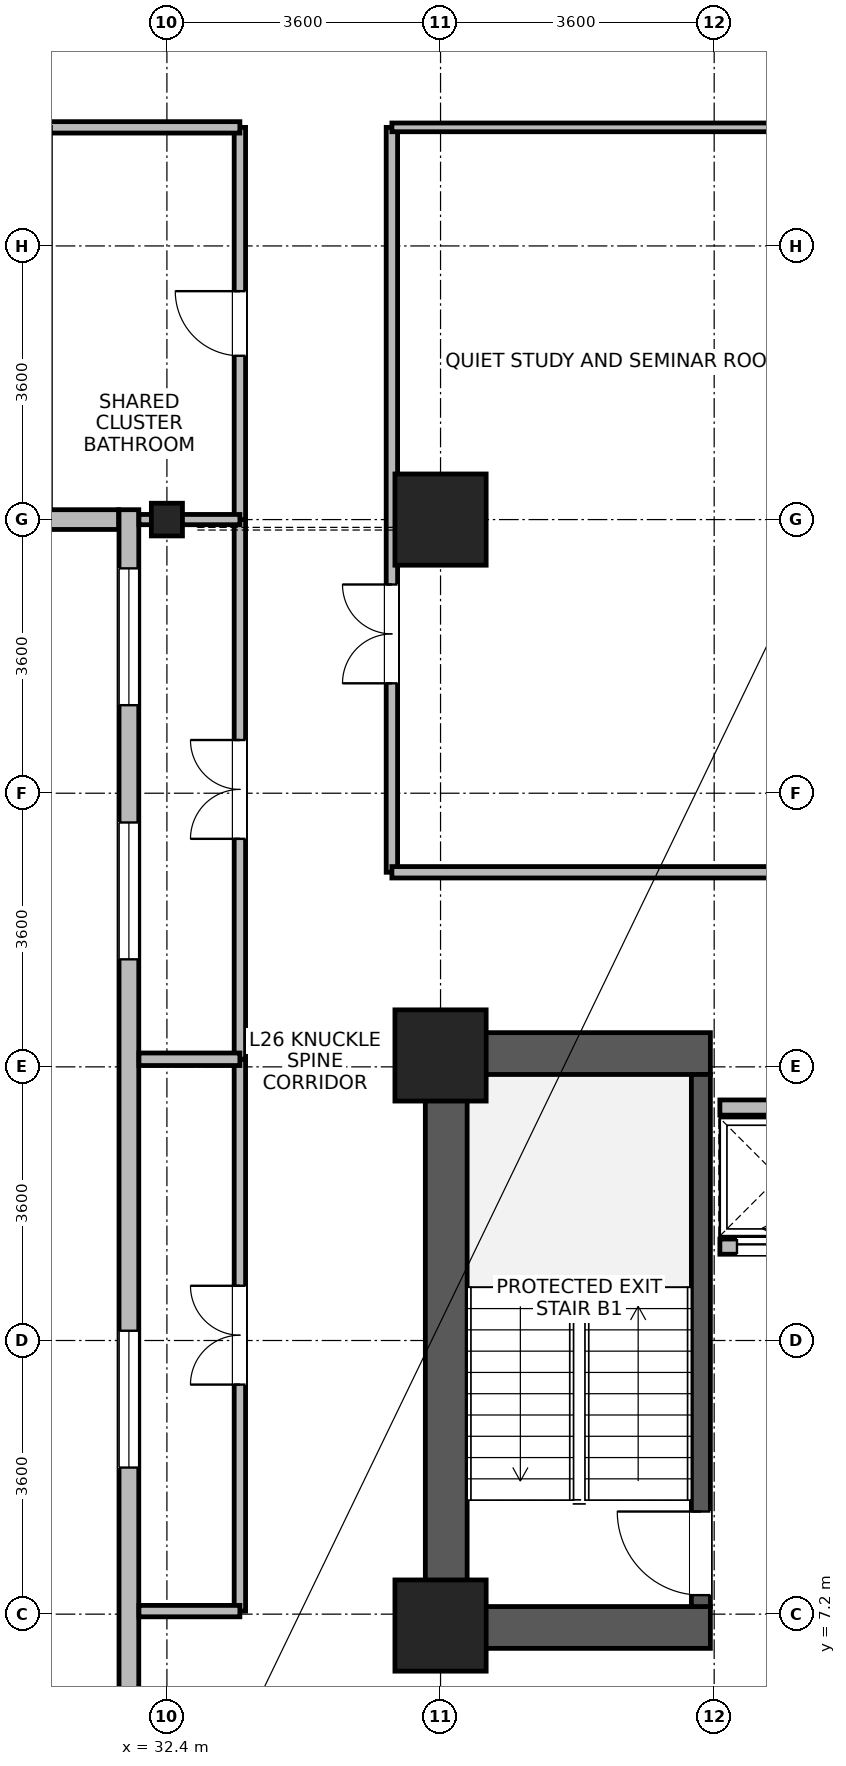
"""IFC4 building model, lengths in metres.
Left out: names, types, materials, properties, quantities, classifications, styles, units other than length and angle.
Written with IfcOpenShell. Run it as: python <this file> out.ifc"""

import sys

from ifc_helpers import new_model, si_unit, direction, frame, frame_2d, origin, origin_2d, place, context, subcontext, project, spatial, rectangle, i_section, extrude, source, transform, mapped, element, fill, save


model = new_model("IFC4")
c1 = context("Model", 3, precision=1e-05, world=origin(), true_north=direction((0.0, 1.0)))
c2 = subcontext(c1, "Body", "Model", "MODEL_VIEW")
j1 = project(units=[si_unit("LENGTHUNIT", "METRE"), si_unit("PLANEANGLEUNIT", "RADIAN")], contexts=[c1])
p1 = place(None, origin())
s1 = spatial("IfcSite", under=j1, at=p1, CompositionType="ELEMENT")
p2 = place(p1, origin())
s2 = spatial("IfcBuilding", under=s1, at=p2, CompositionType="ELEMENT")
p3 = place(p2, frame((0.0, 0.0, 104.5)))
s3 = spatial("IfcBuildingStorey", under=s2, at=p3, CompositionType="ELEMENT", Elevation=104.5)
p4 = place(p3, frame((36.075, 6.75, 0.0), z_axis=(0.0, 0.0, 1.0), x_axis=(0.0, 1.0, 0.0)))
e1 = element("IfcWall", 1, at=p4, inside=s3, PredefinedType="SHEAR", context=c2, shape_type="SweptSolid", body=[
    extrude(rectangle(XDim=8.1, YDim=0.55, at=frame_2d((4.05, 0.0))), origin(), (0.0, 0.0, 1.0), 3.45),
])
for number, where, z_axis, x_axis in (
    (2, (36.35, 7.025, 0.0), (0.0, 0.0, 1.0), (1.0, 0.0, 0.0)),
    (3, (36.35, 14.575, 0.0), (0.0, 0.0, 1.0), (1.0, 0.0, 0.0)),
):
    element("IfcWall", number, at=place(p3, frame(where, z_axis=z_axis, x_axis=x_axis)), inside=s3, PredefinedType="SHEAR", context=c2, shape_type="SweptSolid", body=[
        extrude(rectangle(XDim=3.2, YDim=0.55, at=frame_2d((1.6, 0.0))), origin(), (0.0, 0.0, 1.0), 3.45),
    ])
p5 = place(p3, frame((39.425, 7.3, 0.0), z_axis=(0.0, 0.0, 1.0), x_axis=(0.0, 1.0, 0.0)))
e4 = element("IfcWall", 4, at=p5, inside=s3, PredefinedType="SHEAR", context=c2, shape_type="SweptSolid", body=[
    extrude(rectangle(XDim=7.0, YDim=0.25, at=frame_2d((3.5, 0.0))), origin(), (0.0, 0.0, 1.0), 3.45),
])
p6 = place(p5, frame((0.15, 0.0, 0.0)))
e5 = element("IfcOpeningElement", 5, at=p6, cuts=e4, PredefinedType="OPENING", context=c2, shape_type="SweptSolid", body=[
    extrude(rectangle(XDim=1.1, YDim=2.08, at=frame_2d((0.55, 1.04))), frame((0.0, 0.135, 0.0), z_axis=(0.0, -1.0, 0.0), x_axis=(1.0, 0.0, 0.0)), (0.0, 0.0, 1.0), 0.27),
])
m1 = source(origin(), c2, "Body", "SweptSolid", [
    extrude(rectangle(XDim=1.2, YDim=1.2, at=origin_2d()), origin(), (0.0, 0.0, 1.0), 3.7),
])
for number, where, z_axis, x_axis in (
    (6, (36.0, 21.6, 0.0), (0.0, 0.0, 1.0), (1.0, 0.0, 0.0)),
    (7, (36.0, 7.05, 0.0), (0.0, 0.0, 1.0), (1.0, 0.0, 0.0)),
    (8, (36.0, 14.55, 0.0), (0.0, 0.0, 1.0), (1.0, 0.0, 0.0)),
):
    element("IfcColumn", number, at=place(p3, frame(where, z_axis=z_axis, x_axis=x_axis)), inside=s3, PredefinedType="COLUMN", context=c2, shape_type="MappedRepresentation", body=[
        mapped(m1, transform((0.0, 0.0, 0.0), x_axis=(1.0, 0.0, 0.0), y_axis=(0.0, 1.0, 0.0), z_axis=(0.0, 0.0, 1.0), scale=1.0)),
    ])
m2 = source(origin(), c2, "Body", "SweptSolid", [
    extrude(i_section(OverallWidth=0.409, OverallDepth=0.43, WebThickness=0.024, FlangeThickness=0.033, FilletRadius=0.015, at=origin_2d()), origin(), (0.0, 0.0, 1.0), 3.7),
])
p7 = place(p3, frame((32.4, 21.6, 0.0), z_axis=(0.0, 0.0, 1.0), x_axis=(1.0, 0.0, 0.0)))
e9 = element("IfcColumn", 9, at=p7, inside=s3, PredefinedType="COLUMN", context=c2, shape_type="MappedRepresentation", body=[
    mapped(m2, transform((0.0, 0.0, 0.0), x_axis=(1.0, 0.0, 0.0), y_axis=(0.0, 1.0, 0.0), z_axis=(0.0, 0.0, 1.0), scale=1.0)),
])
p8 = place(p3, frame((31.765, 21.6, 0.0), z_axis=(0.0, 0.0, 1.0), x_axis=(-1.0, 0.0, 0.0)))
e10 = element("IfcWall", 10, at=p8, inside=s3, PredefinedType="STANDARD", context=c2, shape_type="SweptSolid", body=[
    extrude(rectangle(XDim=2.364, YDim=0.26, at=frame_2d((1.182, 0.0))), origin(), (0.0, 0.0, 1.0), 2.98),
])
p9 = place(p3, frame((31.9, 1.67, 0.0), z_axis=(0.0, 0.0, 1.0), x_axis=(0.0, 1.0, 0.0)))
e11 = element("IfcWall", 11, at=p9, inside=s3, PredefinedType="STANDARD", context=c2, shape_type="SweptSolid", body=[
    extrude(rectangle(XDim=20.06, YDim=0.26, at=frame_2d((10.03, 0.0))), origin(), (0.0, 0.0, 1.0), 3.43),
])
p10 = place(p9, frame((0.772, 0.0, 0.85)))
e12 = element("IfcOpeningElement", 12, at=p10, cuts=e11, PredefinedType="OPENING", context=c2, shape_type="SweptSolid", body=[
    extrude(rectangle(XDim=1.8, YDim=1.85, at=frame_2d((0.9, 0.925))), frame((0.0, 0.14, 0.0), z_axis=(0.0, -1.0, 0.0), x_axis=(1.0, 0.0, 0.0)), (0.0, 0.0, 1.0), 0.28),
])
p11 = place(p9, frame((7.458, 0.0, 0.85)))
e13 = element("IfcOpeningElement", 13, at=p11, cuts=e11, PredefinedType="OPENING", context=c2, shape_type="SweptSolid", body=[
    extrude(rectangle(XDim=1.8, YDim=1.85, at=frame_2d((0.9, 0.925))), frame((0.0, 0.14, 0.0), z_axis=(0.0, -1.0, 0.0), x_axis=(1.0, 0.0, 0.0)), (0.0, 0.0, 1.0), 0.28),
])
p12 = place(p9, frame((14.145, 0.0, 0.85)))
e14 = element("IfcOpeningElement", 14, at=p12, cuts=e11, PredefinedType="OPENING", context=c2, shape_type="SweptSolid", body=[
    extrude(rectangle(XDim=1.8, YDim=1.85, at=frame_2d((0.9, 0.925))), frame((0.0, 0.14, 0.0), z_axis=(0.0, -1.0, 0.0), x_axis=(1.0, 0.0, 0.0)), (0.0, 0.0, 1.0), 0.28),
])
p13 = place(p9, frame((17.488, 0.0, 0.85)))
e15 = element("IfcOpeningElement", 15, at=p13, cuts=e11, PredefinedType="OPENING", context=c2, shape_type="SweptSolid", body=[
    extrude(rectangle(XDim=1.8, YDim=1.85, at=frame_2d((0.9, 0.925))), frame((0.0, 0.14, 0.0), z_axis=(0.0, -1.0, 0.0), x_axis=(1.0, 0.0, 0.0)), (0.0, 0.0, 1.0), 0.28),
])
p14 = place(p3, frame((39.675, 12.035, 0.0), z_axis=(0.0, 0.0, 1.0), x_axis=(1.0, 0.0, 0.0)))
e16 = element("IfcWall", 16, at=p14, inside=s3, PredefinedType="PARTITIONING", context=c2, shape_type="SweptSolid", body=[
    extrude(rectangle(XDim=1.55, YDim=0.2, at=frame_2d((0.775, 0.0))), origin(), (0.0, 0.0, 1.0), 3.43),
])
p15 = place(p14, frame((0.225, 0.0, 0.0)))
e17 = element("IfcOpeningElement", 17, at=p15, cuts=e16, PredefinedType="OPENING", context=c2, shape_type="SweptSolid", body=[
    extrude(rectangle(XDim=1.1, YDim=2.12, at=frame_2d((0.55, 1.06))), frame((0.0, 0.11, 0.0), z_axis=(0.0, -1.0, 0.0), x_axis=(1.0, 0.0, 0.0)), (0.0, 0.0, 1.0), 0.22),
])
p16 = place(p3, frame((39.675, 13.865, 0.0), z_axis=(0.0, 0.0, 1.0), x_axis=(1.0, 0.0, 0.0)))
e18 = element("IfcWall", 18, at=p16, inside=s3, PredefinedType="PARTITIONING", context=c2, shape_type="SweptSolid", body=[
    extrude(rectangle(XDim=1.55, YDim=0.2, at=frame_2d((0.775, 0.0))), origin(), (0.0, 0.0, 1.0), 3.43),
])
p17 = place(p3, frame((35.36, 16.96, 0.0), z_axis=(0.0, 0.0, 1.0), x_axis=(0.0, 1.0, 0.0)))
e19 = element("IfcWall", 19, at=p17, inside=s3, PredefinedType="PARTITIONING", context=c2, shape_type="SweptSolid", body=[
    extrude(rectangle(XDim=9.8, YDim=0.15, at=frame_2d((4.9, 0.0))), origin(), (0.0, 0.0, 1.0), 3.43),
])
p18 = place(p17, frame((2.486, 0.0, 0.0)))
e20 = element("IfcOpeningElement", 20, at=p18, cuts=e19, PredefinedType="OPENING", context=c2, shape_type="SweptSolid", body=[
    extrude(rectangle(XDim=1.3, YDim=2.12, at=frame_2d((0.65, 1.06))), frame((0.0, 0.085, 0.0), z_axis=(0.0, -1.0, 0.0), x_axis=(1.0, 0.0, 0.0)), (0.0, 0.0, 1.0), 0.17),
])
p19 = place(p3, frame((33.36, 7.24, 0.0), z_axis=(0.0, 0.0, 1.0), x_axis=(0.0, 1.0, 0.0)))
e21 = element("IfcWall", 21, at=p19, inside=s3, PredefinedType="PARTITIONING", context=c2, shape_type="SweptSolid", body=[
    extrude(rectangle(XDim=7.26, YDim=0.15, at=frame_2d((3.63, 0.0))), origin(), (0.0, 0.0, 1.0), 3.43),
])
p20 = place(p19, frame((2.98, 0.0, 0.0)))
e22 = element("IfcOpeningElement", 22, at=p20, cuts=e21, PredefinedType="OPENING", context=c2, shape_type="SweptSolid", body=[
    extrude(rectangle(XDim=1.3, YDim=2.12, at=frame_2d((0.65, 1.06))), frame((0.0, 0.085, 0.0), z_axis=(0.0, -1.0, 0.0), x_axis=(1.0, 0.0, 0.0)), (0.0, 0.0, 1.0), 0.17),
])
p21 = place(p3, frame((33.36, 14.5, 0.0), z_axis=(0.0, 0.0, 1.0), x_axis=(0.0, 1.0, 0.0)))
e23 = element("IfcWall", 23, at=p21, inside=s3, PredefinedType="PARTITIONING", context=c2, shape_type="SweptSolid", body=[
    extrude(rectangle(XDim=7.1, YDim=0.15, at=frame_2d((3.55, 0.0))), origin(), (0.0, 0.0, 1.0), 3.43),
])
p22 = place(p21, frame((2.9, 0.0, 0.0)))
e24 = element("IfcOpeningElement", 24, at=p22, cuts=e23, PredefinedType="OPENING", context=c2, shape_type="SweptSolid", body=[
    extrude(rectangle(XDim=1.3, YDim=2.12, at=frame_2d((0.65, 1.06))), frame((0.0, 0.085, 0.0), z_axis=(0.0, -1.0, 0.0), x_axis=(1.0, 0.0, 0.0)), (0.0, 0.0, 1.0), 0.17),
])
p23 = place(p3, frame((35.36, 16.96, 0.0), z_axis=(0.0, 0.0, 1.0), x_axis=(1.0, 0.0, 0.0)))
e25 = element("IfcWall", 25, at=p23, inside=s3, PredefinedType="PARTITIONING", context=c2, shape_type="SweptSolid", body=[
    extrude(rectangle(XDim=5.86, YDim=0.15, at=frame_2d((2.93, 0.0))), origin(), (0.0, 0.0, 1.0), 3.43),
])
p24 = place(p3, frame((33.36, 21.6, 0.0), z_axis=(0.0, 0.0, 1.0), x_axis=(0.0, 1.0, 0.0)))
e26 = element("IfcWall", 26, at=p24, inside=s3, PredefinedType="PARTITIONING", context=c2, shape_type="SweptSolid", body=[
    extrude(rectangle(XDim=5.16, YDim=0.15, at=frame_2d((2.58, 0.0))), origin(), (0.0, 0.0, 1.0), 3.43),
])
p25 = place(p24, frame((2.155, 0.0, 0.0)))
e27 = element("IfcOpeningElement", 27, at=p25, cuts=e26, PredefinedType="OPENING", context=c2, shape_type="SweptSolid", body=[
    extrude(rectangle(XDim=0.85, YDim=2.04, at=frame_2d((0.425, 1.02))), frame((0.0, 0.085, 0.0), z_axis=(0.0, -1.0, 0.0), x_axis=(1.0, 0.0, 0.0)), (0.0, 0.0, 1.0), 0.17),
])
p26 = place(p3, frame((30.8, 26.76, 0.0), z_axis=(0.0, 0.0, 1.0), x_axis=(1.0, 0.0, 0.0)))
e28 = element("IfcWall", 28, at=p26, inside=s3, PredefinedType="PARTITIONING", context=c2, shape_type="SweptSolid", body=[
    extrude(rectangle(XDim=2.56, YDim=0.15, at=frame_2d((1.28, 0.0))), origin(), (0.0, 0.0, 1.0), 3.43),
])
p27 = place(p3, frame((32.032, 7.24, 0.0), z_axis=(0.0, 0.0, 1.0), x_axis=(1.0, 0.0, 0.0)))
e29 = element("IfcWall", 29, at=p27, inside=s3, PredefinedType="PARTITIONING", context=c2, shape_type="SweptSolid", body=[
    extrude(rectangle(XDim=1.328, YDim=0.15, at=frame_2d((0.664, 0.0))), origin(), (0.0, 0.0, 1.0), 3.43),
])
p28 = place(p3, frame((35.36, 26.76, 0.0), z_axis=(0.0, 0.0, 1.0), x_axis=(1.0, 0.0, 0.0)))
e30 = element("IfcWall", 30, at=p28, inside=s3, PredefinedType="PARTITIONING", context=c2, shape_type="SweptSolid", body=[
    extrude(rectangle(XDim=5.86, YDim=0.115, at=frame_2d((2.93, 0.0))), origin(), (0.0, 0.0, 1.0), 3.43),
])
p29 = place(p3, frame((32.032, 14.5, 0.0), z_axis=(0.0, 0.0, 1.0), x_axis=(1.0, 0.0, 0.0)))
e31 = element("IfcWall", 31, at=p29, inside=s3, PredefinedType="PARTITIONING", context=c2, shape_type="SweptSolid", body=[
    extrude(rectangle(XDim=1.328, YDim=0.165, at=frame_2d((0.664, 0.0))), origin(), (0.0, 0.0, 1.0), 3.43),
])
p30 = place(p3, frame((32.032, 21.6, 0.0), z_axis=(0.0, 0.0, 1.0), x_axis=(1.0, 0.0, 0.0)))
e32 = element("IfcWall", 32, at=p30, inside=s3, PredefinedType="PARTITIONING", context=c2, shape_type="SweptSolid", body=[
    extrude(rectangle(XDim=1.328, YDim=0.135, at=frame_2d((0.664, 0.0))), origin(), (0.0, 0.0, 1.0), 2.98),
])
p31 = place(p11, origin())
e33 = element("IfcWindow", 33, at=p31, inside=s3, PartitioningType="SINGLE_PANEL", PredefinedType="WINDOW", context=c2, shape_type="SweptSolid", body=[
    extrude(rectangle(XDim=1.8, YDim=1.85, at=frame_2d((0.9, 0.925))), frame((0.0, 0.03, 0.0), z_axis=(0.0, -1.0, 0.0), x_axis=(1.0, 0.0, 0.0)), (0.0, 0.0, 1.0), 0.06),
])
fill(e13, e33)
p32 = place(p12, origin())
e34 = element("IfcWindow", 34, at=p32, inside=s3, PartitioningType="SINGLE_PANEL", PredefinedType="WINDOW", context=c2, shape_type="SweptSolid", body=[
    extrude(rectangle(XDim=1.8, YDim=1.85, at=frame_2d((0.9, 0.925))), frame((0.0, 0.03, 0.0), z_axis=(0.0, -1.0, 0.0), x_axis=(1.0, 0.0, 0.0)), (0.0, 0.0, 1.0), 0.06),
])
fill(e14, e34)
p33 = place(p13, origin())
e35 = element("IfcWindow", 35, at=p33, inside=s3, PartitioningType="SINGLE_PANEL", PredefinedType="WINDOW", context=c2, shape_type="SweptSolid", body=[
    extrude(rectangle(XDim=1.8, YDim=1.85, at=frame_2d((0.9, 0.925))), frame((0.0, 0.03, 0.0), z_axis=(0.0, -1.0, 0.0), x_axis=(1.0, 0.0, 0.0)), (0.0, 0.0, 1.0), 0.06),
])
fill(e15, e35)
p34 = place(p6, origin())
e36 = element("IfcDoor", 36, at=p34, inside=s3, OperationType="SINGLE_SWING_RIGHT", PredefinedType="DOOR", context=c2, shape_type="SweptSolid", body=[
    extrude(rectangle(XDim=1.1, YDim=2.08, at=frame_2d((0.55, 1.04))), frame((0.0, 0.025, 0.0), z_axis=(0.0, -1.0, 0.0), x_axis=(1.0, 0.0, 0.0)), (0.0, 0.0, 1.0), 0.05),
])
fill(e5, e36)
p35 = place(p15, origin())
e37 = element("IfcDoor", 37, at=p35, inside=s3, OperationType="SLIDING_TO_LEFT", PredefinedType="DOOR", context=c2, shape_type="SweptSolid", body=[
    extrude(rectangle(XDim=1.1, YDim=2.12, at=frame_2d((0.55, 1.06))), frame((0.0, 0.025, 0.0), z_axis=(0.0, -1.0, 0.0), x_axis=(1.0, 0.0, 0.0)), (0.0, 0.0, 1.0), 0.05),
])
fill(e17, e37)
p36 = place(p18, origin())
e38 = element("IfcDoor", 38, at=p36, inside=s3, OperationType="DOUBLE_DOOR_SINGLE_SWING", PredefinedType="DOOR", context=c2, shape_type="SweptSolid", body=[
    extrude(rectangle(XDim=1.3, YDim=2.12, at=frame_2d((0.65, 1.06))), frame((0.0, 0.025, 0.0), z_axis=(0.0, -1.0, 0.0), x_axis=(1.0, 0.0, 0.0)), (0.0, 0.0, 1.0), 0.05),
])
fill(e20, e38)
p37 = place(p20, origin())
e39 = element("IfcDoor", 39, at=p37, inside=s3, OperationType="DOUBLE_DOOR_SINGLE_SWING", PredefinedType="DOOR", context=c2, shape_type="SweptSolid", body=[
    extrude(rectangle(XDim=1.3, YDim=2.12, at=frame_2d((0.65, 1.06))), frame((0.0, 0.025, 0.0), z_axis=(0.0, -1.0, 0.0), x_axis=(1.0, 0.0, 0.0)), (0.0, 0.0, 1.0), 0.05),
])
fill(e22, e39)
p38 = place(p22, origin())
e40 = element("IfcDoor", 40, at=p38, inside=s3, OperationType="DOUBLE_DOOR_SINGLE_SWING", PredefinedType="DOOR", context=c2, shape_type="SweptSolid", body=[
    extrude(rectangle(XDim=1.3, YDim=2.12, at=frame_2d((0.65, 1.06))), frame((0.0, 0.025, 0.0), z_axis=(0.0, -1.0, 0.0), x_axis=(1.0, 0.0, 0.0)), (0.0, 0.0, 1.0), 0.05),
])
fill(e24, e40)
p39 = place(p25, origin())
e41 = element("IfcDoor", 41, at=p39, inside=s3, OperationType="SINGLE_SWING_RIGHT", PredefinedType="DOOR", context=c2, shape_type="SweptSolid", body=[
    extrude(rectangle(XDim=0.85, YDim=2.04, at=frame_2d((0.425, 1.02))), frame((0.0, 0.025, 0.0), z_axis=(0.0, -1.0, 0.0), x_axis=(1.0, 0.0, 0.0)), (0.0, 0.0, 1.0), 0.05),
])
fill(e27, e41)
save(model, sys.argv[1])
